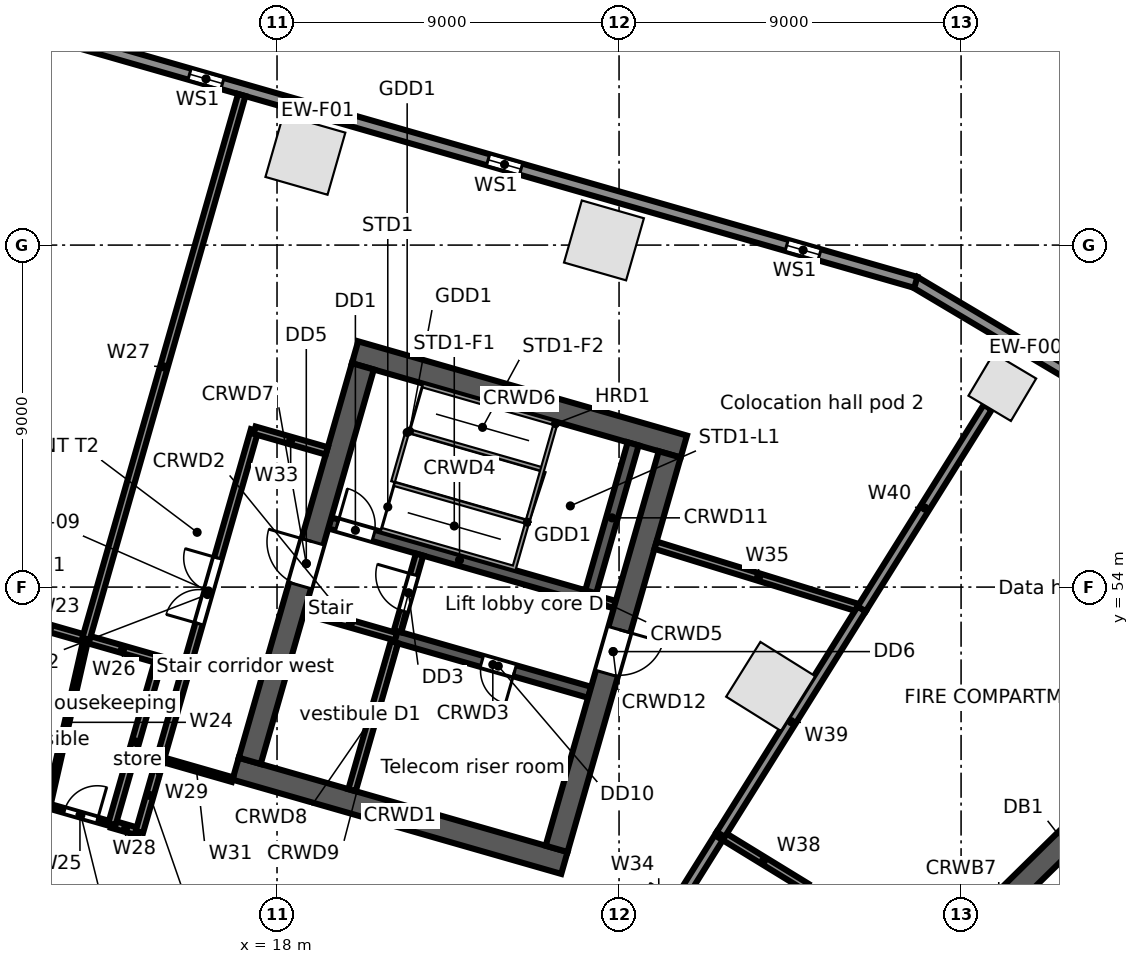
"""IFC4 building model, lengths in metres.
Left out: names, types, materials, properties, quantities, classifications, styles, units other than length and angle.
Written with IfcOpenShell. Run it as: python <this file> out.ifc"""

import sys

from ifc_helpers import new_model, si_unit, direction, frame, frame_2d, origin, origin_2d, place, context, subcontext, project, spatial, rectangle, extrude, element, fill, save


model = new_model("IFC4")
c1 = context("Model", 3, precision=1e-05, world=origin(), true_north=direction((0.0, 1.0)))
c2 = subcontext(c1, "Body", "Model", "MODEL_VIEW")
j1 = project(units=[si_unit("LENGTHUNIT", "METRE"), si_unit("PLANEANGLEUNIT", "RADIAN")], contexts=[c1])
p1 = place(None, origin())
s1 = spatial("IfcSite", under=j1, at=p1, CompositionType="ELEMENT")
p2 = place(p1, origin())
s2 = spatial("IfcBuilding", under=s1, at=p2, CompositionType="ELEMENT")
p3 = place(p2, frame((0.0, 0.0, 31.5)))
s3 = spatial("IfcBuildingStorey", under=s2, at=p3, CompositionType="ELEMENT", Elevation=31.5)
p4 = place(p3, frame((37.085, 59.262, 0.0), z_axis=(0.0, 0.0, 1.0), x_axis=(-0.859406411501, 0.511293086077, 0.0)))
e1 = element("IfcColumn", 1, at=p4, inside=s3, PredefinedType="COLUMN", context=c2, shape_type="SweptSolid", body=[
    extrude(rectangle(XDim=1.3, YDim=1.3, at=origin_2d()), origin(), (0.0, 0.0, 1.0), 5.0),
])
for number, where, z_axis, x_axis in (
    (2, (26.603, 63.124, 0.0), (0.0, 0.0, 1.0), (-0.961, 0.276, 0.0)),
    (3, (18.746, 65.376, 0.0), (0.0, 0.0, 1.0), (-0.961, 0.276, 0.0)),
    (4, (30.99, 51.386, 0.0), (0.0, 0.0, 1.0), (0.53, 0.848, 0.0)),
):
    element("IfcColumn", number, at=place(p3, frame(where, z_axis=z_axis, x_axis=x_axis)), inside=s3, PredefinedType="COLUMN", context=c2, shape_type="SweptSolid", body=[
        extrude(rectangle(XDim=1.7, YDim=1.7, at=origin_2d()), origin(), (0.0, 0.0, 1.0), 5.0),
    ])
p5 = place(p3, frame((34.773, 62.034, 0.0), z_axis=(0.0, 0.0, 1.0), x_axis=(0.859401317772, -0.511301647769, 0.0)))
e5 = element("IfcWall", 5, at=p5, inside=s3, PredefinedType="STANDARD", context=c2, shape_type="SweptSolid", body=[
    extrude(rectangle(XDim=6.808, YDim=0.3, at=frame_2d((3.404, 0.0))), origin(), (0.0, 0.0, 1.0), 4.68),
])
p6 = place(p3, frame((3.335, 71.044, 0.0), z_axis=(0.0, 0.0, 1.0), x_axis=(0.961260130989, -0.275642813387, 0.0)))
e6 = element("IfcWall", 6, at=p6, inside=s3, PredefinedType="STANDARD", context=c2, shape_type="SweptSolid", body=[
    extrude(rectangle(XDim=32.741, YDim=0.3, at=frame_2d((16.371, 0.0))), origin(), (0.0, 0.0, 1.0), 4.68),
])
p7 = place(p6, frame((29.207, 0.0, 0.6)))
e7 = element("IfcOpeningElement", 7, at=p7, cuts=e6, PredefinedType="OPENING", context=c2, shape_type="SweptSolid", body=[
    extrude(rectangle(XDim=0.9, YDim=3.2, at=frame_2d((0.45, 1.6))), frame((0.0, 0.16, 0.0), z_axis=(0.0, -1.0, 0.0), x_axis=(1.0, 0.0, 0.0)), (0.0, 0.0, 1.0), 0.32),
])
p8 = place(p6, frame((21.034, 0.0, 0.6)))
e8 = element("IfcOpeningElement", 8, at=p8, cuts=e6, PredefinedType="OPENING", context=c2, shape_type="SweptSolid", body=[
    extrude(rectangle(XDim=0.9, YDim=3.2, at=frame_2d((0.45, 1.6))), frame((0.0, 0.16, 0.0), z_axis=(0.0, -1.0, 0.0), x_axis=(1.0, 0.0, 0.0)), (0.0, 0.0, 1.0), 0.32),
])
p9 = place(p6, frame((12.861, 0.0, 0.6)))
e9 = element("IfcOpeningElement", 9, at=p9, cuts=e6, PredefinedType="OPENING", context=c2, shape_type="SweptSolid", body=[
    extrude(rectangle(XDim=0.9, YDim=3.2, at=frame_2d((0.45, 1.6))), frame((0.0, 0.16, 0.0), z_axis=(0.0, -1.0, 0.0), x_axis=(1.0, 0.0, 0.0)), (0.0, 0.0, 1.0), 0.32),
])
p10 = place(p6, frame((4.688, 0.0, 0.6)))
e10 = element("IfcOpeningElement", 10, at=p10, cuts=e6, PredefinedType="OPENING", context=c2, shape_type="SweptSolid", body=[
    extrude(rectangle(XDim=0.9, YDim=3.2, at=frame_2d((0.45, 1.6))), frame((0.0, 0.16, 0.0), z_axis=(0.0, -1.0, 0.0), x_axis=(1.0, 0.0, 0.0)), (0.0, 0.0, 1.0), 0.32),
])
p11 = place(p3, frame((25.398, 40.717, 0.0), z_axis=(0.0, 0.0, 1.0), x_axis=(-0.961262423262, 0.275634819324, 0.0)))
e11 = element("IfcWall", 11, at=p11, inside=s3, PredefinedType="STANDARD", context=c2, shape_type="SweptSolid", body=[
    extrude(rectangle(XDim=26.359, YDim=0.3, at=frame_2d((13.179, 0.0))), origin(), (0.0, 0.0, 1.0), 4.68),
])
p12 = place(p11, frame((22.664, 0.0, 0.6)))
e12 = element("IfcOpeningElement", 12, at=p12, cuts=e11, PredefinedType="OPENING", context=c2, shape_type="SweptSolid", body=[
    extrude(rectangle(XDim=0.9, YDim=3.2, at=frame_2d((0.45, 1.6))), frame((0.0, 0.16, 0.0), z_axis=(0.0, -1.0, 0.0), x_axis=(1.0, 0.0, 0.0)), (0.0, 0.0, 1.0), 0.32),
])
p13 = place(p11, frame((13.844, 0.0, 0.6)))
e13 = element("IfcOpeningElement", 13, at=p13, cuts=e11, PredefinedType="OPENING", context=c2, shape_type="SweptSolid", body=[
    extrude(rectangle(XDim=0.9, YDim=3.2, at=frame_2d((0.45, 1.6))), frame((0.0, 0.16, 0.0), z_axis=(0.0, -1.0, 0.0), x_axis=(1.0, 0.0, 0.0)), (0.0, 0.0, 1.0), 0.32),
])
p14 = place(p11, frame((5.023, 0.0, 0.6)))
e14 = element("IfcOpeningElement", 14, at=p14, cuts=e11, PredefinedType="OPENING", context=c2, shape_type="SweptSolid", body=[
    extrude(rectangle(XDim=0.9, YDim=3.2, at=frame_2d((0.45, 1.6))), frame((0.0, 0.16, 0.0), z_axis=(0.0, -1.0, 0.0), x_axis=(1.0, 0.0, 0.0)), (0.0, 0.0, 1.0), 0.32),
])
p15 = place(p3, frame((32.07, 40.759, 0.0), z_axis=(0.0, 0.0, 1.0), x_axis=(0.713245344712, 0.70091445858, 0.0)))
e15 = element("IfcWall", 15, at=p15, inside=s3, PredefinedType="SOLIDWALL", context=c2, shape_type="SweptSolid", body=[
    extrude(rectangle(XDim=13.8, YDim=0.6, at=frame_2d((6.9, 0.0))), origin(), (0.0, 0.0, 1.0), 4.68),
])
p16 = place(p3, frame((16.911, 49.221, 0.0), z_axis=(0.0, 0.0, 1.0), x_axis=(0.96126248289, -0.275634611374, 0.0)))
e16 = element("IfcWall", 16, at=p16, inside=s3, PredefinedType="SOLIDWALL", context=c2, shape_type="SweptSolid", body=[
    extrude(rectangle(XDim=9.0, YDim=0.6, at=frame_2d((4.5, 0.0))), origin(), (0.0, 0.0, 1.0), 4.68),
])
p17 = place(p3, frame((18.728, 53.382, 0.0), z_axis=(0.0, 0.0, 1.0), x_axis=(0.961247070632, -0.275688355216, 0.0)))
e17 = element("IfcWall", 17, at=p17, inside=s3, PredefinedType="SOLIDWALL", context=c2, shape_type="SweptSolid", body=[
    extrude(rectangle(XDim=2.5, YDim=0.2, at=frame_2d((1.25, 0.0))), origin(), (0.0, 0.0, 1.0), 4.68),
])
p18 = place(p3, frame((21.131, 52.692, 0.0), z_axis=(0.0, 0.0, 1.0), x_axis=(0.961271492568, -0.275603188616, 0.0)))
e18 = element("IfcWall", 18, at=p18, inside=s3, PredefinedType="SOLIDWALL", context=c2, shape_type="SweptSolid", body=[
    extrude(rectangle(XDim=5.3, YDim=0.3, at=frame_2d((2.65, 0.0))), origin(), (0.0, 0.0, 1.0), 4.68),
])
p19 = place(p18, frame((2.35, 0.0, 0.0)))
e19 = element("IfcOpeningElement", 19, at=p19, cuts=e18, PredefinedType="OPENING", context=c2, shape_type="SweptSolid", body=[
    extrude(rectangle(XDim=0.9, YDim=2.1, at=frame_2d((0.45, 1.05))), frame((0.0, 0.16, 0.0), z_axis=(0.0, -1.0, 0.0), x_axis=(1.0, 0.0, 0.0)), (0.0, 0.0, 1.0), 0.32),
])
p20 = place(p3, frame((19.389, 55.689, 0.0), z_axis=(0.0, 0.0, 1.0), x_axis=(0.961261397636, -0.275638396117, 0.0)))
e20 = element("IfcWall", 20, at=p20, inside=s3, PredefinedType="SOLIDWALL", context=c2, shape_type="SweptSolid", body=[
    extrude(rectangle(XDim=7.1, YDim=0.3, at=frame_2d((3.55, 0.0))), origin(), (0.0, 0.0, 1.0), 4.68),
])
p21 = place(p20, frame((0.2, 0.0, 0.0)))
e21 = element("IfcOpeningElement", 21, at=p21, cuts=e20, PredefinedType="OPENING", context=c2, shape_type="SweptSolid", body=[
    extrude(rectangle(XDim=1.0, YDim=2.1, at=frame_2d((0.5, 1.05))), frame((0.0, 0.16, 0.0), z_axis=(0.0, -1.0, 0.0), x_axis=(1.0, 0.0, 0.0)), (0.0, 0.0, 1.0), 0.32),
])
p22 = place(p3, frame((26.214, 53.732, 0.0), z_axis=(0.0, 0.0, 1.0), x_axis=(0.96122076476, -0.27578005982, 0.0)))
e22 = element("IfcWall", 22, at=p22, inside=s3, PredefinedType="SOLIDWALL", context=c2, shape_type="SweptSolid", body=[
    extrude(rectangle(XDim=0.7, YDim=0.2, at=frame_2d((0.35, 0.0))), origin(), (0.0, 0.0, 1.0), 4.68),
])
p23 = place(p3, frame((20.053, 60.18, 0.0), z_axis=(0.0, 0.0, 1.0), x_axis=(0.96126248289, -0.275634611374, 0.0)))
e23 = element("IfcWall", 23, at=p23, inside=s3, PredefinedType="SOLIDWALL", context=c2, shape_type="SweptSolid", body=[
    extrude(rectangle(XDim=9.0, YDim=0.6, at=frame_2d((4.5, 0.0))), origin(), (0.0, 0.0, 1.0), 4.68),
])
p24 = place(p3, frame((17.282, 49.427, 0.0), z_axis=(0.0, 0.0, 1.0), x_axis=(0.275631631629, 0.961263337304, 0.0)))
e24 = element("IfcWall", 24, at=p24, inside=s3, PredefinedType="SOLIDWALL", context=c2, shape_type="SweptSolid", body=[
    extrude(rectangle(XDim=10.8, YDim=0.6, at=frame_2d((5.4, 0.0))), origin(), (0.0, 0.0, 1.0), 4.68),
])
p25 = place(p24, frame((4.8, 0.0, 0.0)))
e25 = element("IfcOpeningElement", 25, at=p25, cuts=e24, PredefinedType="OPENING", context=c2, shape_type="SweptSolid", body=[
    extrude(rectangle(XDim=1.2, YDim=2.1, at=frame_2d((0.6, 1.05))), frame((0.0, 0.31, 0.0), z_axis=(0.0, -1.0, 0.0), x_axis=(1.0, 0.0, 0.0)), (0.0, 0.0, 1.0), 0.62),
])
p26 = place(p3, frame((19.973, 48.655, 0.0), z_axis=(0.0, 0.0, 1.0), x_axis=(0.275668441653, 0.961252781674, 0.0)))
e26 = element("IfcWall", 26, at=p26, inside=s3, PredefinedType="SOLIDWALL", context=c2, shape_type="SweptSolid", body=[
    extrude(rectangle(XDim=4.05, YDim=0.2, at=frame_2d((2.025, 0.0))), origin(), (0.0, 0.0, 1.0), 4.68),
])
p27 = place(p3, frame((21.172, 52.837, 0.0), z_axis=(0.0, 0.0, 1.0), x_axis=(0.275657676022, 0.961255868981, 0.0)))
e27 = element("IfcWall", 27, at=p27, inside=s3, PredefinedType="PARTITIONING", context=c2, shape_type="SweptSolid", body=[
    extrude(rectangle(XDim=2.1, YDim=0.2, at=frame_2d((1.05, 0.0))), origin(), (0.0, 0.0, 1.0), 4.68),
])
p28 = place(p27, frame((0.55, 0.0, 0.0)))
e28 = element("IfcOpeningElement", 28, at=p28, cuts=e27, PredefinedType="OPENING", context=c2, shape_type="SweptSolid", body=[
    extrude(rectangle(XDim=1.0, YDim=2.1, at=frame_2d((0.5, 1.05))), frame((0.0, 0.11, 0.0), z_axis=(0.0, -1.0, 0.0), x_axis=(1.0, 0.0, 0.0)), (0.0, 0.0, 1.0), 0.22),
])
p29 = place(p3, frame((26.256, 53.876, 0.0), z_axis=(0.0, 0.0, 1.0), x_axis=(0.275612739511, 0.961268754209, 0.0)))
e29 = element("IfcWall", 29, at=p29, inside=s3, PredefinedType="SOLIDWALL", context=c2, shape_type="SweptSolid", body=[
    extrude(rectangle(XDim=4.05, YDim=0.3, at=frame_2d((2.025, 0.0))), origin(), (0.0, 0.0, 1.0), 4.68),
])
p30 = place(p3, frame((25.356, 47.112, 0.0), z_axis=(0.0, 0.0, 1.0), x_axis=(0.275631631629, 0.961263337304, 0.0)))
e30 = element("IfcWall", 30, at=p30, inside=s3, PredefinedType="SOLIDWALL", context=c2, shape_type="SweptSolid", body=[
    extrude(rectangle(XDim=10.8, YDim=0.6, at=frame_2d((5.4, 0.0))), origin(), (0.0, 0.0, 1.0), 4.68),
])
p31 = place(p30, frame((4.8, 0.0, 0.0)))
e31 = element("IfcOpeningElement", 31, at=p31, cuts=e30, PredefinedType="OPENING", context=c2, shape_type="SweptSolid", body=[
    extrude(rectangle(XDim=1.2, YDim=2.1, at=frame_2d((0.6, 1.05))), frame((0.0, 0.31, 0.0), z_axis=(0.0, -1.0, 0.0), x_axis=(1.0, 0.0, 0.0)), (0.0, 0.0, 1.0), 0.62),
])
p32 = place(p3, frame((11.051, 53.19, 0.0), z_axis=(0.0, 0.0, 1.0), x_axis=(0.961316434736, -0.275446387355, 0.0)))
e32 = element("IfcWall", 32, at=p32, inside=s3, PredefinedType="PARTITIONING", context=c2, shape_type="SweptSolid", body=[
    extrude(rectangle(XDim=2.0, YDim=0.2, at=frame_2d((1.0, 0.0))), origin(), (0.0, 0.0, 1.0), 4.68),
])
p33 = place(p3, frame((11.973, 48.244, 0.0), z_axis=(0.0, 0.0, 1.0), x_axis=(0.222117362571, 0.975019936845, 0.0)))
e33 = element("IfcWall", 33, at=p33, inside=s3, PredefinedType="PARTITIONING", context=c2, shape_type="SweptSolid", body=[
    extrude(rectangle(XDim=4.508, YDim=0.125, at=frame_2d((2.254, 0.0))), origin(), (0.0, 0.0, 1.0), 4.68),
])
p34 = place(p3, frame((11.973, 48.244, 0.0), z_axis=(0.0, 0.0, 1.0), x_axis=(0.96136592135, -0.275273618907, 0.0)))
e34 = element("IfcWall", 34, at=p34, inside=s3, PredefinedType="PARTITIONING", context=c2, shape_type="SweptSolid", body=[
    extrude(rectangle(XDim=1.751, YDim=0.125, at=frame_2d((0.875, 0.0))), origin(), (0.0, 0.0, 1.0), 4.68),
])
p35 = place(p34, frame((0.45, 0.0, 0.0)))
e35 = element("IfcOpeningElement", 35, at=p35, cuts=e34, PredefinedType="OPENING", context=c2, shape_type="SweptSolid", body=[
    extrude(rectangle(XDim=0.9, YDim=2.1, at=frame_2d((0.45, 1.05))), frame((0.0, 0.073, 0.0), z_axis=(0.0, -1.0, 0.0), x_axis=(1.0, 0.0, 0.0)), (0.0, 0.0, 1.0), 0.145),
])
p36 = place(p3, frame((12.974, 52.639, 0.0), z_axis=(0.0, 0.0, 1.0), x_axis=(0.961270097305, -0.275608055084, 0.0)))
e36 = element("IfcWall", 36, at=p36, inside=s3, PredefinedType="PARTITIONING", context=c2, shape_type="SweptSolid", body=[
    extrude(rectangle(XDim=1.999, YDim=0.2, at=frame_2d((1.0, 0.0))), origin(), (0.0, 0.0, 1.0), 4.68),
])
p37 = place(p3, frame((12.974, 52.639, 0.0), z_axis=(0.0, 0.0, 1.0), x_axis=(0.275299463768, 0.961358520662, 0.0)))
e37 = element("IfcWall", 37, at=p37, inside=s3, PredefinedType="PARTITIONING", context=c2, shape_type="SweptSolid", body=[
    extrude(rectangle(XDim=14.885, YDim=0.2, at=frame_2d((7.443, 0.0))), origin(), (0.0, 0.0, 1.0), 3.742),
])
p38 = place(p3, frame((13.656, 47.762, 0.0), z_axis=(0.0, 0.0, 1.0), x_axis=(0.961154610169, -0.276010534854, 0.0)))
e38 = element("IfcWall", 38, at=p38, inside=s3, PredefinedType="PARTITIONING", context=c2, shape_type="SweptSolid", body=[
    extrude(rectangle(XDim=0.75, YDim=0.2, at=frame_2d((0.375, 0.0))), origin(), (0.0, 0.0, 1.0), 4.68),
])
p39 = place(p3, frame((13.656, 47.762, 0.0), z_axis=(0.0, 0.0, 1.0), x_axis=(0.275545040649, 0.96128816209, 0.0)))
e39 = element("IfcWall", 39, at=p39, inside=s3, PredefinedType="PARTITIONING", context=c2, shape_type="SweptSolid", body=[
    extrude(rectangle(XDim=4.5, YDim=0.2, at=frame_2d((2.25, 0.0))), origin(), (0.0, 0.0, 1.0), 4.68),
])
p40 = place(p3, frame((14.377, 47.555, 0.0), z_axis=(0.0, 0.0, 1.0), x_axis=(0.275446387355, 0.961316434736, 0.0)))
e40 = element("IfcWall", 40, at=p40, inside=s3, PredefinedType="PARTITIONING", context=c2, shape_type="SweptSolid", body=[
    extrude(rectangle(XDim=2.0, YDim=0.2, at=frame_2d((1.0, 0.0))), origin(), (0.0, 0.0, 1.0), 4.68),
])
p41 = place(p3, frame((14.928, 49.478, 0.0), z_axis=(0.0, 0.0, 1.0), x_axis=(0.961243778232, -0.27569983462, 0.0)))
e41 = element("IfcWall", 41, at=p41, inside=s3, PredefinedType="PARTITIONING", context=c2, shape_type="SweptSolid", body=[
    extrude(rectangle(XDim=1.977, YDim=0.125, at=frame_2d((0.988, 0.0))), origin(), (0.0, 0.0, 1.0), 4.68),
])
p42 = place(p3, frame((14.928, 49.478, 0.0), z_axis=(0.0, 0.0, 1.0), x_axis=(0.275674053528, 0.961251172281, 0.0)))
e42 = element("IfcWall", 42, at=p42, inside=s3, PredefinedType="PARTITIONING", context=c2, shape_type="SweptSolid", body=[
    extrude(rectangle(XDim=9.0, YDim=0.2, at=frame_2d((4.5, 0.0))), origin(), (0.0, 0.0, 1.0), 3.742),
])
p43 = place(p42, frame((3.7, 0.0, 0.0)))
e43 = element("IfcOpeningElement", 43, at=p43, cuts=e42, PredefinedType="OPENING", context=c2, shape_type="SweptSolid", body=[
    extrude(rectangle(XDim=1.8, YDim=2.1, at=frame_2d((0.9, 1.05))), frame((0.0, 0.11, 0.0), z_axis=(0.0, -1.0, 0.0), x_axis=(1.0, 0.0, 0.0)), (0.0, 0.0, 1.0), 0.22),
])
p44 = place(p3, frame((17.409, 58.129, 0.0), z_axis=(0.0, 0.0, 1.0), x_axis=(0.961253165474, -0.275667103345, 0.0)))
e44 = element("IfcWall", 44, at=p44, inside=s3, PredefinedType="PARTITIONING", context=c2, shape_type="SweptSolid", body=[
    extrude(rectangle(XDim=1.977, YDim=0.2, at=frame_2d((0.988, 0.0))), origin(), (0.0, 0.0, 1.0), 4.68),
])
p45 = place(p3, frame((26.456, 42.338, 0.0), z_axis=(0.0, 0.0, 1.0), x_axis=(0.52980027265, 0.848122438743, 0.0)))
e45 = element("IfcWall", 45, at=p45, inside=s3, PredefinedType="PARTITIONING", context=c2, shape_type="SweptSolid", body=[
    extrude(rectangle(XDim=6.076, YDim=0.25, at=frame_2d((3.038, 0.0))), origin(), (0.0, 0.0, 1.0), 4.68),
])
p46 = place(p45, frame((2.2, 0.0, 0.0)))
e46 = element("IfcOpeningElement", 46, at=p46, cuts=e45, PredefinedType="OPENING", context=c2, shape_type="SweptSolid", body=[
    extrude(rectangle(XDim=1.8, YDim=2.1, at=frame_2d((0.9, 1.05))), frame((0.0, 0.135, 0.0), z_axis=(0.0, -1.0, 0.0), x_axis=(1.0, 0.0, 0.0)), (0.0, 0.0, 1.0), 0.27),
])
p47 = place(p3, frame((27.96, 55.103, 0.0), z_axis=(0.0, 0.0, 1.0), x_axis=(0.955442775069, -0.29517639399, 0.0)))
e47 = element("IfcWall", 47, at=p47, inside=s3, PredefinedType="PARTITIONING", context=c2, shape_type="SweptSolid", body=[
    extrude(rectangle(XDim=5.678, YDim=0.2, at=frame_2d((2.839, 0.0))), origin(), (0.0, 0.0, 1.0), 3.748),
])
p48 = place(p3, frame((29.675, 47.491, 0.0), z_axis=(0.0, 0.0, 1.0), x_axis=(0.852591965232, -0.522577210392, 0.0)))
e48 = element("IfcWall", 48, at=p48, inside=s3, PredefinedType="PARTITIONING", context=c2, shape_type="SweptSolid", body=[
    extrude(rectangle(XDim=2.645, YDim=0.2, at=frame_2d((1.322, 0.0))), origin(), (0.0, 0.0, 1.0), 4.68),
])
p49 = place(p3, frame((29.675, 47.491, 0.0), z_axis=(0.0, 0.0, 1.0), x_axis=(0.529992669945, 0.848002222759, 0.0)))
e49 = element("IfcWall", 49, at=p49, inside=s3, PredefinedType="PARTITIONING", context=c2, shape_type="SweptSolid", body=[
    extrude(rectangle(XDim=7.0, YDim=0.25, at=frame_2d((3.5, 0.0))), origin(), (0.0, 0.0, 1.0), 3.742),
])
p50 = place(p3, frame((33.385, 53.427, 0.0), z_axis=(0.0, 0.0, 1.0), x_axis=(0.529897235032, 0.848061861131, 0.0)))
e50 = element("IfcWall", 50, at=p50, inside=s3, PredefinedType="PARTITIONING", context=c2, shape_type="SweptSolid", body=[
    extrude(rectangle(XDim=6.258, YDim=0.25, at=frame_2d((3.129, 0.0))), origin(), (0.0, 0.0, 1.0), 3.742),
])
p51 = place(p7, origin())
e51 = element("IfcWindow", 51, at=p51, inside=s3, PartitioningType="SINGLE_PANEL", PredefinedType="WINDOW", context=c2, shape_type="SweptSolid", body=[
    extrude(rectangle(XDim=0.9, YDim=3.2, at=frame_2d((0.45, 1.6))), frame((0.0, 0.03, 0.0), z_axis=(0.0, -1.0, 0.0), x_axis=(1.0, 0.0, 0.0)), (0.0, 0.0, 1.0), 0.06),
])
fill(e7, e51)
p52 = place(p8, origin())
e52 = element("IfcWindow", 52, at=p52, inside=s3, PartitioningType="SINGLE_PANEL", PredefinedType="WINDOW", context=c2, shape_type="SweptSolid", body=[
    extrude(rectangle(XDim=0.9, YDim=3.2, at=frame_2d((0.45, 1.6))), frame((0.0, 0.03, 0.0), z_axis=(0.0, -1.0, 0.0), x_axis=(1.0, 0.0, 0.0)), (0.0, 0.0, 1.0), 0.06),
])
fill(e8, e52)
p53 = place(p9, origin())
e53 = element("IfcWindow", 53, at=p53, inside=s3, PartitioningType="SINGLE_PANEL", PredefinedType="WINDOW", context=c2, shape_type="SweptSolid", body=[
    extrude(rectangle(XDim=0.9, YDim=3.2, at=frame_2d((0.45, 1.6))), frame((0.0, 0.03, 0.0), z_axis=(0.0, -1.0, 0.0), x_axis=(1.0, 0.0, 0.0)), (0.0, 0.0, 1.0), 0.06),
])
fill(e9, e53)
p54 = place(p21, origin())
e54 = element("IfcDoor", 54, at=p54, inside=s3, OperationType="SINGLE_SWING_LEFT", PredefinedType="DOOR", context=c2, shape_type="SweptSolid", body=[
    extrude(rectangle(XDim=1.0, YDim=2.1, at=frame_2d((0.5, 1.05))), frame((0.0, 0.025, 0.0), z_axis=(0.0, -1.0, 0.0), x_axis=(1.0, 0.0, 0.0)), (0.0, 0.0, 1.0), 0.05),
])
fill(e21, e54)
p55 = place(p28, origin())
e55 = element("IfcDoor", 55, at=p55, inside=s3, OperationType="SINGLE_SWING_RIGHT", PredefinedType="DOOR", context=c2, shape_type="SweptSolid", body=[
    extrude(rectangle(XDim=1.0, YDim=2.1, at=frame_2d((0.5, 1.05))), frame((0.0, 0.025, 0.0), z_axis=(0.0, -1.0, 0.0), x_axis=(1.0, 0.0, 0.0)), (0.0, 0.0, 1.0), 0.05),
])
fill(e28, e55)
p56 = place(p25, origin())
e56 = element("IfcDoor", 56, at=p56, inside=s3, OperationType="SINGLE_SWING_RIGHT", PredefinedType="DOOR", context=c2, shape_type="SweptSolid", body=[
    extrude(rectangle(XDim=1.2, YDim=2.1, at=frame_2d((0.6, 1.05))), frame((0.0, 0.025, 0.0), z_axis=(0.0, -1.0, 0.0), x_axis=(1.0, 0.0, 0.0)), (0.0, 0.0, 1.0), 0.05),
])
fill(e25, e56)
p57 = place(p31, frame((1.2, 0.0, 0.0), z_axis=(0.0, 0.0, 1.0), x_axis=(-1.0, 0.0, 0.0)))
e57 = element("IfcDoor", 57, at=p57, inside=s3, OperationType="SINGLE_SWING_LEFT", PredefinedType="DOOR", context=c2, shape_type="SweptSolid", body=[
    extrude(rectangle(XDim=1.2, YDim=2.1, at=frame_2d((0.6, 1.05))), frame((0.0, 0.025, 0.0), z_axis=(0.0, -1.0, 0.0), x_axis=(1.0, 0.0, 0.0)), (0.0, 0.0, 1.0), 0.05),
])
fill(e31, e57)
p58 = place(p19, frame((0.9, 0.0, 0.0), z_axis=(0.0, 0.0, 1.0), x_axis=(-1.0, 0.0, 0.0)))
e58 = element("IfcDoor", 58, at=p58, inside=s3, OperationType="SINGLE_SWING_LEFT", PredefinedType="DOOR", context=c2, shape_type="SweptSolid", body=[
    extrude(rectangle(XDim=0.9, YDim=2.1, at=frame_2d((0.45, 1.05))), frame((0.0, 0.025, 0.0), z_axis=(0.0, -1.0, 0.0), x_axis=(1.0, 0.0, 0.0)), (0.0, 0.0, 1.0), 0.05),
])
fill(e19, e58)
p59 = place(p35, origin())
e59 = element("IfcDoor", 59, at=p59, inside=s3, OperationType="SINGLE_SWING_RIGHT", PredefinedType="DOOR", context=c2, shape_type="SweptSolid", body=[
    extrude(rectangle(XDim=0.9, YDim=2.1, at=frame_2d((0.45, 1.05))), frame((0.0, 0.025, 0.0), z_axis=(0.0, -1.0, 0.0), x_axis=(1.0, 0.0, 0.0)), (0.0, 0.0, 1.0), 0.05),
])
fill(e35, e59)
p60 = place(p43, origin())
e60 = element("IfcDoor", 60, at=p60, inside=s3, OperationType="DOUBLE_DOOR_SINGLE_SWING", PredefinedType="DOOR", context=c2, shape_type="SweptSolid", body=[
    extrude(rectangle(XDim=1.8, YDim=2.1, at=frame_2d((0.9, 1.05))), frame((0.0, 0.025, 0.0), z_axis=(0.0, -1.0, 0.0), x_axis=(1.0, 0.0, 0.0)), (0.0, 0.0, 1.0), 0.05),
])
fill(e43, e60)
save(model, sys.argv[1])
